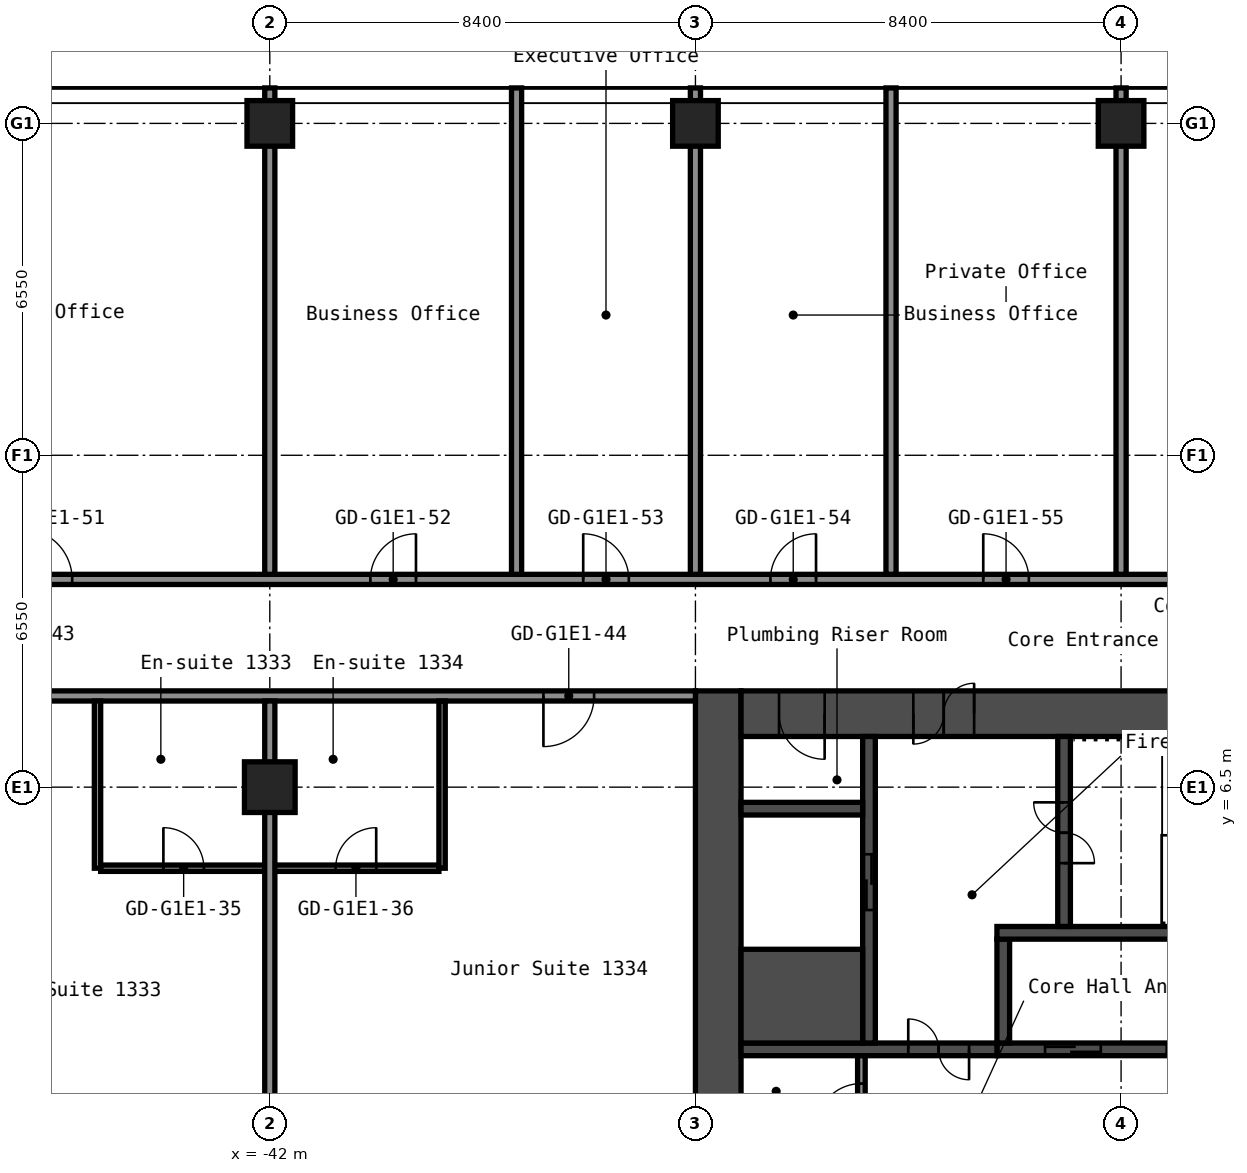
"""IFC4 building model, lengths in metres.
Left out: names, types, materials, properties, quantities, classifications, styles, units other than length and angle.
Written with IfcOpenShell. Run it as: python <this file> out.ifc"""

import sys

from ifc_helpers import new_model, si_unit, direction, frame, frame_2d, origin, origin_2d, place, context, subcontext, project, spatial, rectangle, hollow_rectangle, extrude, element, fill, save


model = new_model("IFC4")
c1 = context("Model", 3, precision=1e-05, world=origin(), true_north=direction((0.0, 1.0)))
c2 = subcontext(c1, "Body", "Model", "MODEL_VIEW")
j1 = project(units=[si_unit("LENGTHUNIT", "METRE"), si_unit("PLANEANGLEUNIT", "RADIAN")], contexts=[c1])
p1 = place(None, origin())
s1 = spatial("IfcSite", under=j1, at=p1, CompositionType="ELEMENT")
p2 = place(p1, origin())
s2 = spatial("IfcBuilding", under=s1, at=p2, CompositionType="ELEMENT")
p3 = place(p2, frame((0.0, 0.0, 48.6)))
s3 = spatial("IfcBuildingStorey", under=s2, at=p3, CompositionType="ELEMENT", Elevation=48.6)
p4 = place(p3, frame((-42.0, 6.5, 0.0), z_axis=(0.0, 0.0, 1.0), x_axis=(1.0, 0.0, 0.0)))
e1 = element("IfcColumn", 1, at=p4, inside=s3, PredefinedType="COLUMN", context=c2, shape_type="SweptSolid", body=[
    extrude(hollow_rectangle(XDim=1.0, YDim=1.0, WallThickness=0.04, at=origin_2d()), origin(), (0.0, 0.0, 1.0), 2.8),
])
for number, where, z_axis, x_axis in (
    (2, (-42.0, 19.6, 0.0), (0.0, 0.0, 1.0), (1.0, 0.0, 0.0)),
    (3, (-33.6, 19.6, 0.0), (0.0, 0.0, 1.0), (1.0, 0.0, 0.0)),
    (4, (-25.2, 19.6, 0.0), (0.0, 0.0, 1.0), (1.0, 0.0, 0.0)),
):
    element("IfcColumn", number, at=place(p3, frame(where, z_axis=z_axis, x_axis=x_axis)), inside=s3, PredefinedType="COLUMN", context=c2, shape_type="SweptSolid", body=[
        extrude(hollow_rectangle(XDim=0.9, YDim=0.9, WallThickness=0.036, at=origin_2d()), origin(), (0.0, 0.0, 1.0), 2.8),
    ])
p5 = place(p3, frame((-33.15, -8.4, 0.0), z_axis=(0.0, 0.0, 1.0), x_axis=(0.0, 1.0, 0.0)))
e5 = element("IfcWall", 5, at=p5, inside=s3, PredefinedType="SHEAR", context=c2, shape_type="SweptSolid", body=[
    extrude(rectangle(XDim=16.8, YDim=0.9, at=frame_2d((8.4, 0.0))), origin(), (0.0, 0.0, 1.0), 2.8),
])
p6 = place(p3, frame((-32.7, 7.95, 0.0), z_axis=(0.0, 0.0, 1.0), x_axis=(1.0, 0.0, 0.0)))
e6 = element("IfcWall", 6, at=p6, inside=s3, PredefinedType="SHEAR", context=c2, shape_type="SweptSolid", body=[
    extrude(rectangle(XDim=15.0, YDim=0.9, at=frame_2d((7.5, 0.0))), origin(), (0.0, 0.0, 1.0), 2.8),
])
p7 = place(p6, frame((3.4, 0.0, 0.0)))
e7 = element("IfcOpeningElement", 7, at=p7, cuts=e6, PredefinedType="OPENING", context=c2, shape_type="SweptSolid", body=[
    extrude(rectangle(XDim=1.2, YDim=2.1, at=frame_2d((0.6, 1.05))), frame((0.0, 0.46, 0.0), z_axis=(0.0, -1.0, 0.0), x_axis=(1.0, 0.0, 0.0)), (0.0, 0.0, 1.0), 0.92),
])
p8 = place(p6, frame((0.75, 0.0, 0.0)))
e8 = element("IfcOpeningElement", 8, at=p8, cuts=e6, PredefinedType="OPENING", context=c2, shape_type="SweptSolid", body=[
    extrude(rectangle(XDim=0.9, YDim=2.1, at=frame_2d((0.45, 1.05))), frame((0.0, 0.46, 0.0), z_axis=(0.0, -1.0, 0.0), x_axis=(1.0, 0.0, 0.0)), (0.0, 0.0, 1.0), 0.92),
])
p9 = place(p3, frame((-27.65, 1.325, 0.0), z_axis=(0.0, 0.0, 1.0), x_axis=(1.0, 0.0, 0.0)))
e9 = element("IfcWall", 9, at=p9, inside=s3, PredefinedType="SHEAR", context=c2, shape_type="SweptSolid", body=[
    extrude(rectangle(XDim=7.5, YDim=0.25, at=frame_2d((3.75, 0.0))), origin(), (0.0, 0.0, 1.0), 2.8),
])
p10 = place(p9, frame((5.75, 0.0, 0.0)))
e10 = element("IfcOpeningElement", 10, at=p10, cuts=e9, PredefinedType="OPENING", context=c2, shape_type="SweptSolid", body=[
    extrude(rectangle(XDim=1.1, YDim=2.1, at=frame_2d((0.55, 1.05))), frame((0.0, 0.135, 0.0), z_axis=(0.0, -1.0, 0.0), x_axis=(1.0, 0.0, 0.0)), (0.0, 0.0, 1.0), 0.27),
])
p11 = place(p9, frame((3.35, 0.0, 0.0)))
e11 = element("IfcOpeningElement", 11, at=p11, cuts=e9, PredefinedType="OPENING", context=c2, shape_type="SweptSolid", body=[
    extrude(rectangle(XDim=1.1, YDim=2.1, at=frame_2d((0.55, 1.05))), frame((0.0, 0.135, 0.0), z_axis=(0.0, -1.0, 0.0), x_axis=(1.0, 0.0, 0.0)), (0.0, 0.0, 1.0), 0.27),
])
p12 = place(p9, frame((0.95, 0.0, 0.0)))
e12 = element("IfcOpeningElement", 12, at=p12, cuts=e9, PredefinedType="OPENING", context=c2, shape_type="SweptSolid", body=[
    extrude(rectangle(XDim=1.1, YDim=2.1, at=frame_2d((0.55, 1.05))), frame((0.0, 0.135, 0.0), z_axis=(0.0, -1.0, 0.0), x_axis=(1.0, 0.0, 0.0)), (0.0, 0.0, 1.0), 0.27),
])
p13 = place(p3, frame((-27.525, 1.45, 0.0), z_axis=(0.0, 0.0, 1.0), x_axis=(0.0, 1.0, 0.0)))
e13 = element("IfcWall", 13, at=p13, inside=s3, PredefinedType="SHEAR", context=c2, shape_type="SweptSolid", body=[
    extrude(rectangle(XDim=2.05, YDim=0.25, at=frame_2d((1.025, 0.0))), origin(), (0.0, 0.0, 1.0), 2.8),
])
p14 = place(p3, frame((-27.65, 3.625, 0.0), z_axis=(0.0, 0.0, 1.0), x_axis=(1.0, 0.0, 0.0)))
e14 = element("IfcWall", 14, at=p14, inside=s3, PredefinedType="SHEAR", context=c2, shape_type="SweptSolid", body=[
    extrude(rectangle(XDim=7.5, YDim=0.25, at=frame_2d((3.75, 0.0))), origin(), (0.0, 0.0, 1.0), 2.8),
])
p15 = place(p3, frame((-26.325, 3.75, 0.0), z_axis=(0.0, 0.0, 1.0), x_axis=(0.0, 1.0, 0.0)))
e15 = element("IfcWall", 15, at=p15, inside=s3, PredefinedType="SHEAR", context=c2, shape_type="SweptSolid", body=[
    extrude(rectangle(XDim=3.75, YDim=0.25, at=frame_2d((1.875, 0.0))), origin(), (0.0, 0.0, 1.0), 2.8),
])
p16 = place(p15, frame((1.25, 0.0, 0.0)))
e16 = element("IfcOpeningElement", 16, at=p16, cuts=e15, PredefinedType="OPENING", context=c2, shape_type="SweptSolid", body=[
    extrude(rectangle(XDim=1.2, YDim=2.1, at=frame_2d((0.6, 1.05))), frame((0.0, 0.135, 0.0), z_axis=(0.0, -1.0, 0.0), x_axis=(1.0, 0.0, 0.0)), (0.0, 0.0, 1.0), 0.27),
])
p17 = place(p3, frame((-32.7, 1.325, 0.0), z_axis=(0.0, 0.0, 1.0), x_axis=(1.0, 0.0, 0.0)))
e17 = element("IfcWall", 17, at=p17, inside=s3, PredefinedType="SHEAR", context=c2, shape_type="SweptSolid", body=[
    extrude(rectangle(XDim=5.05, YDim=0.25, at=frame_2d((2.525, 0.0))), origin(), (0.0, 0.0, 1.0), 2.8),
])
p18 = place(p17, frame((3.3, 0.0, 0.0)))
e18 = element("IfcOpeningElement", 18, at=p18, cuts=e17, PredefinedType="OPENING", context=c2, shape_type="SweptSolid", body=[
    extrude(rectangle(XDim=1.2, YDim=2.1, at=frame_2d((0.6, 1.05))), frame((0.0, 0.135, 0.0), z_axis=(0.0, -1.0, 0.0), x_axis=(1.0, 0.0, 0.0)), (0.0, 0.0, 1.0), 0.27),
])
p19 = place(p3, frame((-30.175, 1.45, 0.0), z_axis=(0.0, 0.0, 1.0), x_axis=(0.0, 1.0, 0.0)))
e19 = element("IfcWall", 19, at=p19, inside=s3, PredefinedType="SHEAR", context=c2, shape_type="SweptSolid", body=[
    extrude(rectangle(XDim=6.05, YDim=0.25, at=frame_2d((3.025, 0.0))), origin(), (0.0, 0.0, 1.0), 2.8),
])
p20 = place(p19, frame((2.625, 0.0, 0.0)))
e20 = element("IfcOpeningElement", 20, at=p20, cuts=e19, PredefinedType="OPENING", context=c2, shape_type="SweptSolid", body=[
    extrude(rectangle(XDim=1.1, YDim=2.1, at=frame_2d((0.55, 1.05))), frame((0.0, 0.135, 0.0), z_axis=(0.0, -1.0, 0.0), x_axis=(1.0, 0.0, 0.0)), (0.0, 0.0, 1.0), 0.27),
])
p21 = place(p3, frame((-32.7, 2.375, 0.0), z_axis=(0.0, 0.0, 1.0), x_axis=(1.0, 0.0, 0.0)))
e21 = element("IfcWall", 21, at=p21, inside=s3, PredefinedType="SHEAR", context=c2, shape_type="SweptSolid", body=[
    extrude(rectangle(XDim=2.4, YDim=1.85, at=frame_2d((1.2, 0.0))), origin(), (0.0, 0.0, 1.0), 2.8),
])
p22 = place(p3, frame((-32.7, 6.075, 0.0), z_axis=(0.0, 0.0, 1.0), x_axis=(1.0, 0.0, 0.0)))
e22 = element("IfcWall", 22, at=p22, inside=s3, PredefinedType="SHEAR", context=c2, shape_type="SweptSolid", body=[
    extrude(rectangle(XDim=2.4, YDim=0.25, at=frame_2d((1.2, 0.0))), origin(), (0.0, 0.0, 1.0), 2.8),
])
p23 = place(p3, frame((-30.325, -0.95, 0.0), z_axis=(0.0, 0.0, 1.0), x_axis=(0.0, 1.0, 0.0)))
e23 = element("IfcWall", 23, at=p23, inside=s3, PredefinedType="PARTITIONING", context=c2, shape_type="SweptSolid", body=[
    extrude(rectangle(XDim=2.15, YDim=0.15, at=frame_2d((1.075, 0.0))), origin(), (0.0, 0.0, 1.0), 2.8),
])
p24 = place(p23, frame((0.7, 0.0, 0.0)))
e24 = element("IfcOpeningElement", 24, at=p24, cuts=e23, PredefinedType="OPENING", context=c2, shape_type="SweptSolid", body=[
    extrude(rectangle(XDim=0.9, YDim=2.1, at=frame_2d((0.45, 1.05))), frame((0.0, 0.085, 0.0), z_axis=(0.0, -1.0, 0.0), x_axis=(1.0, 0.0, 0.0)), (0.0, 0.0, 1.0), 0.17),
])
p25 = place(p3, frame((-45.337, 4.9, 0.0), z_axis=(0.0, 0.0, 1.0), x_axis=(1.0, 0.0, 0.0)))
e25 = element("IfcWall", 25, at=p25, inside=s3, PredefinedType="PARTITIONING", context=c2, shape_type="SweptSolid", body=[
    extrude(rectangle(XDim=6.675, YDim=0.125, at=frame_2d((3.337, 0.0))), origin(), (0.0, 0.0, 1.0), 2.8),
])
p26 = place(p25, frame((1.238, 0.0, 0.0)))
e26 = element("IfcOpeningElement", 26, at=p26, cuts=e25, PredefinedType="OPENING", context=c2, shape_type="SweptSolid", body=[
    extrude(rectangle(XDim=0.8, YDim=2.1, at=frame_2d((0.4, 1.05))), frame((0.0, 0.073, 0.0), z_axis=(0.0, -1.0, 0.0), x_axis=(1.0, 0.0, 0.0)), (0.0, 0.0, 1.0), 0.145),
])
p27 = place(p25, frame((4.637, 0.0, 0.0)))
e27 = element("IfcOpeningElement", 27, at=p27, cuts=e25, PredefinedType="OPENING", context=c2, shape_type="SweptSolid", body=[
    extrude(rectangle(XDim=0.8, YDim=2.1, at=frame_2d((0.4, 1.05))), frame((0.0, 0.073, 0.0), z_axis=(0.0, -1.0, 0.0), x_axis=(1.0, 0.0, 0.0)), (0.0, 0.0, 1.0), 0.145),
])
p28 = place(p3, frame((-48.6, 8.3, 0.0), z_axis=(0.0, 0.0, 1.0), x_axis=(1.0, 0.0, 0.0)))
e28 = element("IfcWall", 28, at=p28, inside=s3, PredefinedType="PARTITIONING", context=c2, shape_type="SweptSolid", body=[
    extrude(rectangle(XDim=15.0, YDim=0.2, at=frame_2d((7.5, 0.0))), origin(), (0.0, 0.0, 1.0), 2.8),
])
p29 = place(p28, frame((1.1, 0.0, 0.0)))
e29 = element("IfcOpeningElement", 29, at=p29, cuts=e28, PredefinedType="OPENING", context=c2, shape_type="SweptSolid", body=[
    extrude(rectangle(XDim=1.0, YDim=2.1, at=frame_2d((0.5, 1.05))), frame((0.0, 0.11, 0.0), z_axis=(0.0, -1.0, 0.0), x_axis=(1.0, 0.0, 0.0)), (0.0, 0.0, 1.0), 0.22),
])
p30 = place(p28, frame((12.0, 0.0, 0.0)))
e30 = element("IfcOpeningElement", 30, at=p30, cuts=e28, PredefinedType="OPENING", context=c2, shape_type="SweptSolid", body=[
    extrude(rectangle(XDim=1.0, YDim=2.1, at=frame_2d((0.5, 1.05))), frame((0.0, 0.11, 0.0), z_axis=(0.0, -1.0, 0.0), x_axis=(1.0, 0.0, 0.0)), (0.0, 0.0, 1.0), 0.22),
])
p31 = place(p3, frame((-51.1, 10.6, 0.0), z_axis=(0.0, 0.0, 1.0), x_axis=(1.0, 0.0, 0.0)))
e31 = element("IfcWall", 31, at=p31, inside=s3, PredefinedType="PARTITIONING", context=c2, shape_type="SweptSolid", body=[
    extrude(rectangle(XDim=34.3, YDim=0.2, at=frame_2d((17.15, 0.0))), origin(), (0.0, 0.0, 1.0), 2.8),
])
p32 = place(p31, frame((4.2, 0.0, 0.0)))
e32 = element("IfcOpeningElement", 32, at=p32, cuts=e31, PredefinedType="OPENING", context=c2, shape_type="SweptSolid", body=[
    extrude(rectangle(XDim=1.0, YDim=2.1, at=frame_2d((0.5, 1.05))), frame((0.0, 0.11, 0.0), z_axis=(0.0, -1.0, 0.0), x_axis=(1.0, 0.0, 0.0)), (0.0, 0.0, 1.0), 0.22),
])
p33 = place(p31, frame((11.085, 0.0, 0.0)))
e33 = element("IfcOpeningElement", 33, at=p33, cuts=e31, PredefinedType="OPENING", context=c2, shape_type="SweptSolid", body=[
    extrude(rectangle(XDim=0.9, YDim=2.1, at=frame_2d((0.45, 1.05))), frame((0.0, 0.11, 0.0), z_axis=(0.0, -1.0, 0.0), x_axis=(1.0, 0.0, 0.0)), (0.0, 0.0, 1.0), 0.22),
])
p34 = place(p31, frame((15.285, 0.0, 0.0)))
e34 = element("IfcOpeningElement", 34, at=p34, cuts=e31, PredefinedType="OPENING", context=c2, shape_type="SweptSolid", body=[
    extrude(rectangle(XDim=0.9, YDim=2.1, at=frame_2d((0.45, 1.05))), frame((0.0, 0.11, 0.0), z_axis=(0.0, -1.0, 0.0), x_axis=(1.0, 0.0, 0.0)), (0.0, 0.0, 1.0), 0.22),
])
p35 = place(p31, frame((18.98, 0.0, 0.0)))
e35 = element("IfcOpeningElement", 35, at=p35, cuts=e31, PredefinedType="OPENING", context=c2, shape_type="SweptSolid", body=[
    extrude(rectangle(XDim=0.9, YDim=2.1, at=frame_2d((0.45, 1.05))), frame((0.0, 0.11, 0.0), z_axis=(0.0, -1.0, 0.0), x_axis=(1.0, 0.0, 0.0)), (0.0, 0.0, 1.0), 0.22),
])
p36 = place(p31, frame((23.18, 0.0, 0.0)))
e36 = element("IfcOpeningElement", 36, at=p36, cuts=e31, PredefinedType="OPENING", context=c2, shape_type="SweptSolid", body=[
    extrude(rectangle(XDim=0.9, YDim=2.1, at=frame_2d((0.45, 1.05))), frame((0.0, 0.11, 0.0), z_axis=(0.0, -1.0, 0.0), x_axis=(1.0, 0.0, 0.0)), (0.0, 0.0, 1.0), 0.22),
])
p37 = place(p31, frame((29.6, 0.0, 0.0)))
e37 = element("IfcOpeningElement", 37, at=p37, cuts=e31, PredefinedType="OPENING", context=c2, shape_type="SweptSolid", body=[
    extrude(rectangle(XDim=1.0, YDim=2.1, at=frame_2d((0.5, 1.05))), frame((0.0, 0.11, 0.0), z_axis=(0.0, -1.0, 0.0), x_axis=(1.0, 0.0, 0.0)), (0.0, 0.0, 1.0), 0.22),
])
p38 = place(p3, frame((-45.4, 4.9, 0.0), z_axis=(0.0, 0.0, 1.0), x_axis=(0.0, 1.0, 0.0)))
e38 = element("IfcWall", 38, at=p38, inside=s3, PredefinedType="PARTITIONING", context=c2, shape_type="SweptSolid", body=[
    extrude(rectangle(XDim=3.3, YDim=0.125, at=frame_2d((1.65, 0.0))), origin(), (0.0, 0.0, 1.0), 2.8),
])
p39 = place(p3, frame((-42.0, -8.2, 0.0), z_axis=(0.0, 0.0, 1.0), x_axis=(0.0, 1.0, 0.0)))
e39 = element("IfcWall", 39, at=p39, inside=s3, PredefinedType="PARTITIONING", context=c2, shape_type="SweptSolid", body=[
    extrude(rectangle(XDim=16.4, YDim=0.2, at=frame_2d((8.2, 0.0))), origin(), (0.0, 0.0, 1.0), 2.8),
])
p40 = place(p3, frame((-42.0, 10.7, 0.0), z_axis=(0.0, 0.0, 1.0), x_axis=(0.0, 1.0, 0.0)))
e40 = element("IfcWall", 40, at=p40, inside=s3, PredefinedType="PARTITIONING", context=c2, shape_type="SweptSolid", body=[
    extrude(rectangle(XDim=9.6, YDim=0.2, at=frame_2d((4.8, 0.0))), origin(), (0.0, 0.0, 1.0), 2.8),
])
p41 = place(p3, frame((-38.6, 4.9, 0.0), z_axis=(0.0, 0.0, 1.0), x_axis=(0.0, 1.0, 0.0)))
e41 = element("IfcWall", 41, at=p41, inside=s3, PredefinedType="PARTITIONING", context=c2, shape_type="SweptSolid", body=[
    extrude(rectangle(XDim=3.3, YDim=0.125, at=frame_2d((1.65, 0.0))), origin(), (0.0, 0.0, 1.0), 2.8),
])
for number, where, z_axis, x_axis in (
    (42, (-37.13, 10.7, 0.0), (0.0, 0.0, 1.0), (0.0, 1.0, 0.0)),
    (43, (-33.6, 10.7, 0.0), (0.0, 0.0, 1.0), (0.0, 1.0, 0.0)),
    (44, (-29.74, 10.7, 0.0), (0.0, 0.0, 1.0), (0.0, 1.0, 0.0)),
    (45, (-25.2, 10.7, 0.0), (0.0, 0.0, 1.0), (0.0, 1.0, 0.0)),
):
    element("IfcWall", number, at=place(p3, frame(where, z_axis=z_axis, x_axis=x_axis)), inside=s3, PredefinedType="PARTITIONING", context=c2, shape_type="SweptSolid", body=[
        extrude(rectangle(XDim=9.6, YDim=0.2, at=frame_2d((4.8, 0.0))), origin(), (0.0, 0.0, 1.0), 2.8),
    ])
p42 = place(p7, origin())
e46 = element("IfcDoor", 46, at=p42, inside=s3, OperationType="DOUBLE_DOOR_SINGLE_SWING", PredefinedType="DOOR", context=c2, shape_type="SweptSolid", body=[
    extrude(rectangle(XDim=1.2, YDim=2.1, at=frame_2d((0.6, 1.05))), frame((0.0, 0.025, 0.0), z_axis=(0.0, -1.0, 0.0), x_axis=(1.0, 0.0, 0.0)), (0.0, 0.0, 1.0), 0.05),
])
fill(e7, e46)
p43 = place(p8, origin())
e47 = element("IfcDoor", 47, at=p43, inside=s3, OperationType="SINGLE_SWING_RIGHT", PredefinedType="DOOR", context=c2, shape_type="SweptSolid", body=[
    extrude(rectangle(XDim=0.9, YDim=2.1, at=frame_2d((0.45, 1.05))), frame((0.0, 0.025, 0.0), z_axis=(0.0, -1.0, 0.0), x_axis=(1.0, 0.0, 0.0)), (0.0, 0.0, 1.0), 0.05),
])
fill(e8, e47)
p44 = place(p16, origin())
e48 = element("IfcDoor", 48, at=p44, inside=s3, OperationType="DOUBLE_DOOR_SINGLE_SWING", PredefinedType="DOOR", context=c2, shape_type="SweptSolid", body=[
    extrude(rectangle(XDim=1.2, YDim=2.1, at=frame_2d((0.6, 1.05))), frame((0.0, 0.025, 0.0), z_axis=(0.0, -1.0, 0.0), x_axis=(1.0, 0.0, 0.0)), (0.0, 0.0, 1.0), 0.05),
])
fill(e16, e48)
p45 = place(p18, origin())
e49 = element("IfcDoor", 49, at=p45, inside=s3, OperationType="DOUBLE_DOOR_SINGLE_SWING", PredefinedType="DOOR", context=c2, shape_type="SweptSolid", body=[
    extrude(rectangle(XDim=1.2, YDim=2.1, at=frame_2d((0.6, 1.05))), frame((0.0, 0.025, 0.0), z_axis=(0.0, -1.0, 0.0), x_axis=(1.0, 0.0, 0.0)), (0.0, 0.0, 1.0), 0.05),
])
fill(e18, e49)
p46 = place(p24, origin())
e50 = element("IfcDoor", 50, at=p46, inside=s3, OperationType="SINGLE_SWING_RIGHT", PredefinedType="DOOR", context=c2, shape_type="SweptSolid", body=[
    extrude(rectangle(XDim=0.9, YDim=2.1, at=frame_2d((0.45, 1.05))), frame((0.0, 0.025, 0.0), z_axis=(0.0, -1.0, 0.0), x_axis=(1.0, 0.0, 0.0)), (0.0, 0.0, 1.0), 0.05),
])
fill(e24, e50)
p47 = place(p12, origin())
e51 = element("IfcDoor", 51, at=p47, inside=s3, OperationType="DOUBLE_DOOR_SLIDING", PredefinedType="DOOR", context=c2, shape_type="SweptSolid", body=[
    extrude(rectangle(XDim=1.1, YDim=2.1, at=frame_2d((0.55, 1.05))), frame((0.0, 0.025, 0.0), z_axis=(0.0, -1.0, 0.0), x_axis=(1.0, 0.0, 0.0)), (0.0, 0.0, 1.0), 0.05),
])
fill(e12, e51)
p48 = place(p20, origin())
e52 = element("IfcDoor", 52, at=p48, inside=s3, OperationType="DOUBLE_DOOR_SLIDING", PredefinedType="DOOR", context=c2, shape_type="SweptSolid", body=[
    extrude(rectangle(XDim=1.1, YDim=2.1, at=frame_2d((0.55, 1.05))), frame((0.0, 0.025, 0.0), z_axis=(0.0, -1.0, 0.0), x_axis=(1.0, 0.0, 0.0)), (0.0, 0.0, 1.0), 0.05),
])
fill(e20, e52)
p49 = place(p26, origin())
e53 = element("IfcDoor", 53, at=p49, inside=s3, OperationType="SINGLE_SWING_RIGHT", PredefinedType="DOOR", context=c2, shape_type="SweptSolid", body=[
    extrude(rectangle(XDim=0.8, YDim=2.1, at=frame_2d((0.4, 1.05))), frame((0.0, 0.025, 0.0), z_axis=(0.0, -1.0, 0.0), x_axis=(1.0, 0.0, 0.0)), (0.0, 0.0, 1.0), 0.05),
])
fill(e26, e53)
p50 = place(p27, origin())
e54 = element("IfcDoor", 54, at=p50, inside=s3, OperationType="SINGLE_SWING_LEFT", PredefinedType="DOOR", context=c2, shape_type="SweptSolid", body=[
    extrude(rectangle(XDim=0.8, YDim=2.1, at=frame_2d((0.4, 1.05))), frame((0.0, 0.025, 0.0), z_axis=(0.0, -1.0, 0.0), x_axis=(1.0, 0.0, 0.0)), (0.0, 0.0, 1.0), 0.05),
])
fill(e27, e54)
p51 = place(p30, origin())
e55 = element("IfcDoor", 55, at=p51, inside=s3, OperationType="SINGLE_SWING_LEFT", PredefinedType="DOOR", context=c2, shape_type="SweptSolid", body=[
    extrude(rectangle(XDim=1.0, YDim=2.1, at=frame_2d((0.5, 1.05))), frame((0.0, 0.025, 0.0), z_axis=(0.0, -1.0, 0.0), x_axis=(1.0, 0.0, 0.0)), (0.0, 0.0, 1.0), 0.05),
])
fill(e30, e55)
p52 = place(p32, origin())
e56 = element("IfcDoor", 56, at=p52, inside=s3, OperationType="SINGLE_SWING_RIGHT", PredefinedType="DOOR", context=c2, shape_type="SweptSolid", body=[
    extrude(rectangle(XDim=1.0, YDim=2.1, at=frame_2d((0.5, 1.05))), frame((0.0, 0.025, 0.0), z_axis=(0.0, -1.0, 0.0), x_axis=(1.0, 0.0, 0.0)), (0.0, 0.0, 1.0), 0.05),
])
fill(e32, e56)
p53 = place(p33, origin())
e57 = element("IfcDoor", 57, at=p53, inside=s3, OperationType="SINGLE_SWING_LEFT", PredefinedType="DOOR", context=c2, shape_type="SweptSolid", body=[
    extrude(rectangle(XDim=0.9, YDim=2.1, at=frame_2d((0.45, 1.05))), frame((0.0, 0.025, 0.0), z_axis=(0.0, -1.0, 0.0), x_axis=(1.0, 0.0, 0.0)), (0.0, 0.0, 1.0), 0.05),
])
fill(e33, e57)
p54 = place(p34, origin())
e58 = element("IfcDoor", 58, at=p54, inside=s3, OperationType="SINGLE_SWING_RIGHT", PredefinedType="DOOR", context=c2, shape_type="SweptSolid", body=[
    extrude(rectangle(XDim=0.9, YDim=2.1, at=frame_2d((0.45, 1.05))), frame((0.0, 0.025, 0.0), z_axis=(0.0, -1.0, 0.0), x_axis=(1.0, 0.0, 0.0)), (0.0, 0.0, 1.0), 0.05),
])
fill(e34, e58)
p55 = place(p35, origin())
e59 = element("IfcDoor", 59, at=p55, inside=s3, OperationType="SINGLE_SWING_LEFT", PredefinedType="DOOR", context=c2, shape_type="SweptSolid", body=[
    extrude(rectangle(XDim=0.9, YDim=2.1, at=frame_2d((0.45, 1.05))), frame((0.0, 0.025, 0.0), z_axis=(0.0, -1.0, 0.0), x_axis=(1.0, 0.0, 0.0)), (0.0, 0.0, 1.0), 0.05),
])
fill(e35, e59)
p56 = place(p36, origin())
e60 = element("IfcDoor", 60, at=p56, inside=s3, OperationType="SINGLE_SWING_RIGHT", PredefinedType="DOOR", context=c2, shape_type="SweptSolid", body=[
    extrude(rectangle(XDim=0.9, YDim=2.1, at=frame_2d((0.45, 1.05))), frame((0.0, 0.025, 0.0), z_axis=(0.0, -1.0, 0.0), x_axis=(1.0, 0.0, 0.0)), (0.0, 0.0, 1.0), 0.05),
])
fill(e36, e60)
save(model, sys.argv[1])
